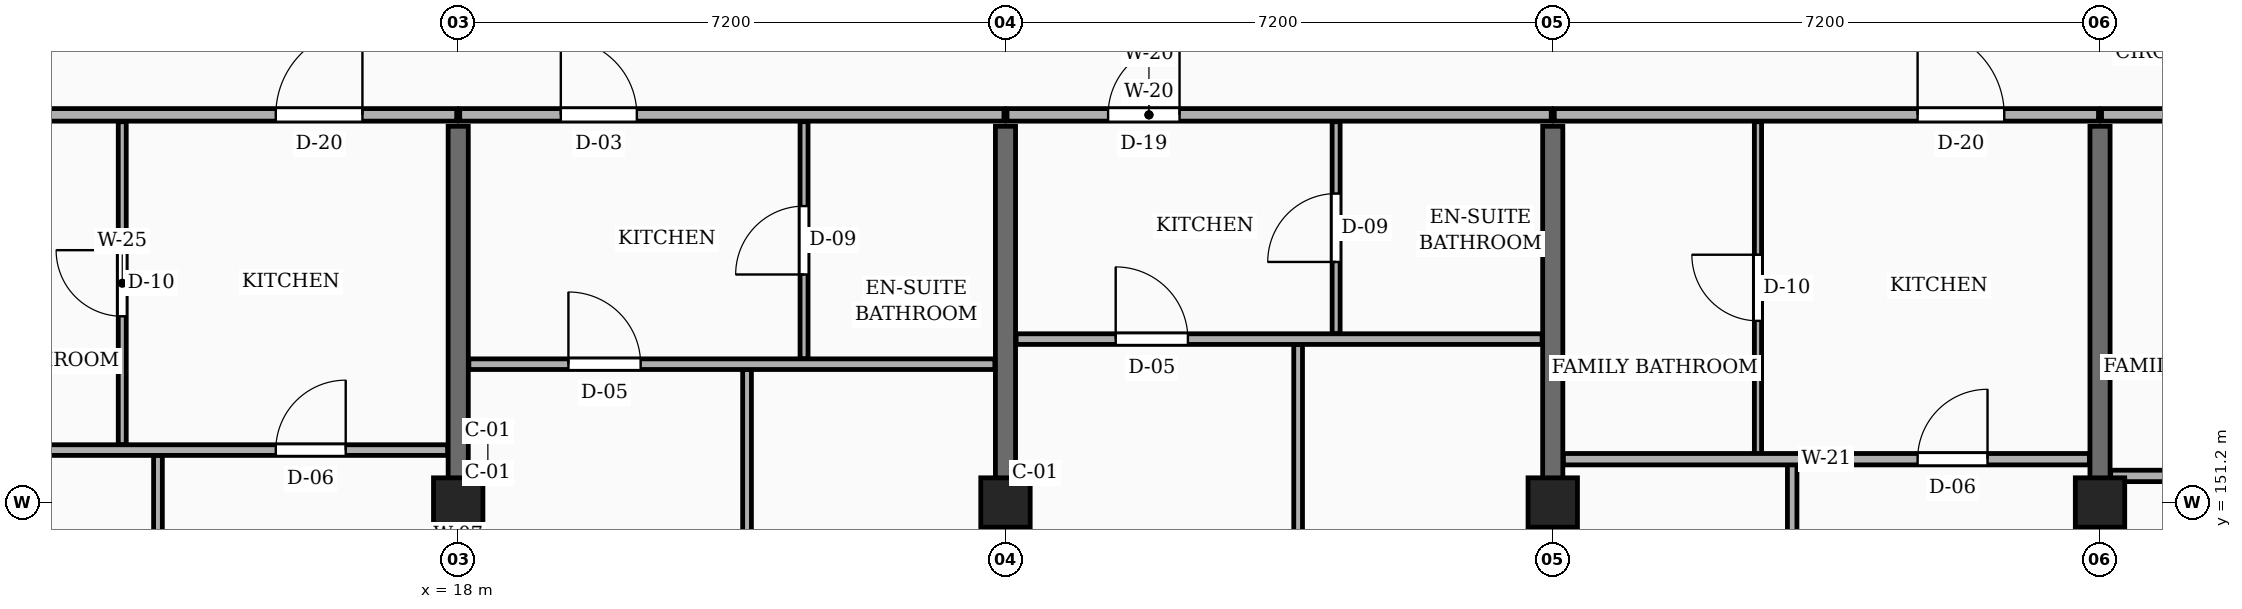
"""IFC4 building model, lengths in metres.
Left out: names, types, materials, properties, quantities, classifications, styles, units other than length and angle.
Written with IfcOpenShell. Run it as: python <this file> out.ifc"""

import sys

from ifc_helpers import new_model, si_unit, direction, frame, frame_2d, origin, origin_2d, place, context, subcontext, project, spatial, rectangle, extrude, element, fill, save


model = new_model("IFC4")
c1 = context("Model", 3, precision=1e-05, world=origin(), true_north=direction((0.0, 1.0)))
c2 = subcontext(c1, "Body", "Model", "MODEL_VIEW")
j1 = project(units=[si_unit("LENGTHUNIT", "METRE"), si_unit("PLANEANGLEUNIT", "RADIAN")], contexts=[c1])
p1 = place(None, origin())
s1 = spatial("IfcSite", under=j1, at=p1, CompositionType="ELEMENT")
p2 = place(p1, origin())
s2 = spatial("IfcBuilding", under=s1, at=p2, CompositionType="ELEMENT")
p3 = place(p2, frame((0.0, 0.0, 4.5)))
s3 = spatial("IfcBuildingStorey", under=s2, at=p3, CompositionType="ELEMENT", Elevation=4.5)
for number, where, z_axis, x_axis in (
    (1, (18.0, 151.2, 0.0), (0.0, 0.0, 1.0), (1.0, 0.0, 0.0)),
    (2, (25.2, 151.2, 0.0), (0.0, 0.0, 1.0), (1.0, 0.0, 0.0)),
    (3, (32.4, 151.2, 0.0), (0.0, 0.0, 1.0), (1.0, 0.0, 0.0)),
    (4, (39.6, 151.2, 0.0), (0.0, 0.0, 1.0), (1.0, 0.0, 0.0)),
):
    element("IfcColumn", number, at=place(p3, frame(where, z_axis=z_axis, x_axis=x_axis)), inside=s3, PredefinedType="COLUMN", context=c2, shape_type="SweptSolid", body=[
        extrude(rectangle(XDim=0.65, YDim=0.65, at=origin_2d()), origin(), (0.0, 0.0, 1.0), 3.15),
    ])
for number, where, z_axis, x_axis in (
    (5, (18.0, 144.3, 0.0), (0.0, 0.0, 1.0), (0.0, 1.0, 0.0)),
    (6, (25.2, 144.3, 0.0), (0.0, 0.0, 1.0), (0.0, 1.0, 0.0)),
    (7, (32.4, 144.3, 0.0), (0.0, 0.0, 1.0), (0.0, 1.0, 0.0)),
    (8, (39.6, 144.3, 0.0), (0.0, 0.0, 1.0), (0.0, 1.0, 0.0)),
):
    element("IfcWall", number, at=place(p3, frame(where, z_axis=z_axis, x_axis=x_axis)), inside=s3, PredefinedType="SOLIDWALL", context=c2, shape_type="SweptSolid", body=[
        extrude(rectangle(XDim=11.85, YDim=0.265, at=frame_2d((5.925, 0.0))), origin(), (0.0, 0.0, 1.0), 2.185),
    ])
p4 = place(p3, frame((10.975, 156.3, 0.0), z_axis=(0.0, 0.0, 1.0), x_axis=(1.0, 0.0, 0.0)))
e9 = element("IfcWall", 9, at=p4, inside=s3, PredefinedType="PARTITIONING", context=c2, shape_type="SweptSolid", body=[
    extrude(rectangle(XDim=7.005, YDim=0.165, at=frame_2d((3.502, 0.0))), origin(), (0.0, 0.0, 1.0), 2.32),
])
p5 = place(p4, frame((4.625, 0.0, 0.0)))
e10 = element("IfcOpeningElement", 10, at=p5, cuts=e9, PredefinedType="OPENING", context=c2, shape_type="SweptSolid", body=[
    extrude(rectangle(XDim=1.14, YDim=2.18, at=frame_2d((0.57, 1.09))), frame((0.0, 0.093, 0.0), z_axis=(0.0, -1.0, 0.0), x_axis=(1.0, 0.0, 0.0)), (0.0, 0.0, 1.0), 0.185),
])
p6 = place(p3, frame((18.02, 156.3, 0.0), z_axis=(0.0, 0.0, 1.0), x_axis=(1.0, 0.0, 0.0)))
e11 = element("IfcWall", 11, at=p6, inside=s3, PredefinedType="PARTITIONING", context=c2, shape_type="SweptSolid", body=[
    extrude(rectangle(XDim=7.16, YDim=0.165, at=frame_2d((3.58, 0.0))), origin(), (0.0, 0.0, 1.0), 2.32),
])
p7 = place(p6, frame((1.33, 0.0, 0.0)))
e12 = element("IfcOpeningElement", 12, at=p7, cuts=e11, PredefinedType="OPENING", context=c2, shape_type="SweptSolid", body=[
    extrude(rectangle(XDim=1.0, YDim=2.15, at=frame_2d((0.5, 1.075))), frame((0.0, 0.093, 0.0), z_axis=(0.0, -1.0, 0.0), x_axis=(1.0, 0.0, 0.0)), (0.0, 0.0, 1.0), 0.185),
])
p8 = place(p3, frame((25.22, 156.3, 0.0), z_axis=(0.0, 0.0, 1.0), x_axis=(1.0, 0.0, 0.0)))
e13 = element("IfcWall", 13, at=p8, inside=s3, PredefinedType="PARTITIONING", context=c2, shape_type="SweptSolid", body=[
    extrude(rectangle(XDim=7.16, YDim=0.165, at=frame_2d((3.58, 0.0))), origin(), (0.0, 0.0, 1.0), 2.32),
])
p9 = place(p8, frame((1.33, 0.0, 0.0)))
e14 = element("IfcOpeningElement", 14, at=p9, cuts=e13, PredefinedType="OPENING", context=c2, shape_type="SweptSolid", body=[
    extrude(rectangle(XDim=0.94, YDim=2.12, at=frame_2d((0.47, 1.06))), frame((0.0, 0.093, 0.0), z_axis=(0.0, -1.0, 0.0), x_axis=(1.0, 0.0, 0.0)), (0.0, 0.0, 1.0), 0.185),
])
p10 = place(p3, frame((32.42, 156.3, 0.0), z_axis=(0.0, 0.0, 1.0), x_axis=(1.0, 0.0, 0.0)))
e15 = element("IfcWall", 15, at=p10, inside=s3, PredefinedType="PARTITIONING", context=c2, shape_type="SweptSolid", body=[
    extrude(rectangle(XDim=7.16, YDim=0.165, at=frame_2d((3.58, 0.0))), origin(), (0.0, 0.0, 1.0), 2.32),
])
p11 = place(p10, frame((4.78, 0.0, 0.0)))
e16 = element("IfcOpeningElement", 16, at=p11, cuts=e15, PredefinedType="OPENING", context=c2, shape_type="SweptSolid", body=[
    extrude(rectangle(XDim=1.14, YDim=2.18, at=frame_2d((0.57, 1.09))), frame((0.0, 0.093, 0.0), z_axis=(0.0, -1.0, 0.0), x_axis=(1.0, 0.0, 0.0)), (0.0, 0.0, 1.0), 0.185),
])
p12 = place(p3, frame((39.62, 156.3, 0.0), z_axis=(0.0, 0.0, 1.0), x_axis=(1.0, 0.0, 0.0)))
e17 = element("IfcWall", 17, at=p12, inside=s3, PredefinedType="PARTITIONING", context=c2, shape_type="SweptSolid", body=[
    extrude(rectangle(XDim=7.16, YDim=0.165, at=frame_2d((3.58, 0.0))), origin(), (0.0, 0.0, 1.0), 2.32),
])
p13 = place(p12, frame((4.78, 0.0, 0.0)))
e18 = element("IfcOpeningElement", 18, at=p13, cuts=e17, PredefinedType="OPENING", context=c2, shape_type="SweptSolid", body=[
    extrude(rectangle(XDim=1.0, YDim=2.15, at=frame_2d((0.5, 1.075))), frame((0.0, 0.093, 0.0), z_axis=(0.0, -1.0, 0.0), x_axis=(1.0, 0.0, 0.0)), (0.0, 0.0, 1.0), 0.185),
])
p14 = place(p3, frame((14.05, 144.175, 0.0), z_axis=(0.0, 0.0, 1.0), x_axis=(0.0, 1.0, 0.0)))
e19 = element("IfcWall", 19, at=p14, inside=s3, PredefinedType="PARTITIONING", context=c2, shape_type="SweptSolid", body=[
    extrude(rectangle(XDim=7.645, YDim=0.115, at=frame_2d((3.823, 0.0))), origin(), (0.0, 0.0, 1.0), 2.32),
])
p15 = place(p14, frame((3.383, 0.0, 0.0)))
e20 = element("IfcOpeningElement", 20, at=p15, cuts=e19, PredefinedType="OPENING", context=c2, shape_type="SweptSolid", body=[
    extrude(rectangle(XDim=0.88, YDim=2.08, at=frame_2d((0.44, 1.04))), frame((0.0, 0.067, 0.0), z_axis=(0.0, -1.0, 0.0), x_axis=(1.0, 0.0, 0.0)), (0.0, 0.0, 1.0), 0.135),
])
p16 = place(p3, frame((13.58, 151.96, 0.0), z_axis=(0.0, 0.0, 1.0), x_axis=(0.0, 1.0, 0.0)))
e21 = element("IfcWall", 21, at=p16, inside=s3, PredefinedType="PARTITIONING", context=c2, shape_type="SweptSolid", body=[
    extrude(rectangle(XDim=4.25, YDim=0.105, at=frame_2d((2.125, 0.0))), origin(), (0.0, 0.0, 1.0), 2.32),
])
p17 = place(p16, frame((1.69, 0.0, 0.0)))
e22 = element("IfcOpeningElement", 22, at=p17, cuts=e21, PredefinedType="OPENING", context=c2, shape_type="SweptSolid", body=[
    extrude(rectangle(XDim=0.87, YDim=2.05, at=frame_2d((0.435, 1.025))), frame((0.0, 0.062, 0.0), z_axis=(0.0, -1.0, 0.0), x_axis=(1.0, 0.0, 0.0)), (0.0, 0.0, 1.0), 0.125),
])
p18 = place(p3, frame((10.975, 151.89, 0.0), z_axis=(0.0, 0.0, 1.0), x_axis=(1.0, 0.0, 0.0)))
e23 = element("IfcWall", 23, at=p18, inside=s3, PredefinedType="PARTITIONING", context=c2, shape_type="SweptSolid", body=[
    extrude(rectangle(XDim=6.885, YDim=0.14, at=frame_2d((3.442, 0.0))), origin(), (0.0, 0.0, 1.0), 2.32),
])
p19 = place(p18, frame((4.625, 0.0, 0.0)))
e24 = element("IfcOpeningElement", 24, at=p19, cuts=e23, PredefinedType="OPENING", context=c2, shape_type="SweptSolid", body=[
    extrude(rectangle(XDim=0.92, YDim=2.1, at=frame_2d((0.46, 1.05))), frame((0.0, 0.08, 0.0), z_axis=(0.0, -1.0, 0.0), x_axis=(1.0, 0.0, 0.0)), (0.0, 0.0, 1.0), 0.16),
])
p20 = place(p3, frame((21.8, 144.175, 0.0), z_axis=(0.0, 0.0, 1.0), x_axis=(0.0, 1.0, 0.0)))
e25 = element("IfcWall", 25, at=p20, inside=s3, PredefinedType="PARTITIONING", context=c2, shape_type="SweptSolid", body=[
    extrude(rectangle(XDim=8.775, YDim=0.115, at=frame_2d((4.387, 0.0))), origin(), (0.0, 0.0, 1.0), 2.32),
])
p21 = place(p20, frame((3.938, 0.0, 0.0)))
e26 = element("IfcOpeningElement", 26, at=p21, cuts=e25, PredefinedType="OPENING", context=c2, shape_type="SweptSolid", body=[
    extrude(rectangle(XDim=0.9, YDim=2.1, at=frame_2d((0.45, 1.05))), frame((0.0, 0.067, 0.0), z_axis=(0.0, -1.0, 0.0), x_axis=(1.0, 0.0, 0.0)), (0.0, 0.0, 1.0), 0.135),
])
p22 = place(p3, frame((22.55, 153.09, 0.0), z_axis=(0.0, 0.0, 1.0), x_axis=(0.0, 1.0, 0.0)))
e27 = element("IfcWall", 27, at=p22, inside=s3, PredefinedType="PARTITIONING", context=c2, shape_type="SweptSolid", body=[
    extrude(rectangle(XDim=3.12, YDim=0.105, at=frame_2d((1.56, 0.0))), origin(), (0.0, 0.0, 1.0), 2.32),
])
p23 = place(p22, frame((1.11, 0.0, 0.0)))
e28 = element("IfcOpeningElement", 28, at=p23, cuts=e27, PredefinedType="OPENING", context=c2, shape_type="SweptSolid", body=[
    extrude(rectangle(XDim=0.9, YDim=2.05, at=frame_2d((0.45, 1.025))), frame((0.0, 0.062, 0.0), z_axis=(0.0, -1.0, 0.0), x_axis=(1.0, 0.0, 0.0)), (0.0, 0.0, 1.0), 0.125),
])
p24 = place(p3, frame((18.14, 153.02, 0.0), z_axis=(0.0, 0.0, 1.0), x_axis=(1.0, 0.0, 0.0)))
e29 = element("IfcWall", 29, at=p24, inside=s3, PredefinedType="PARTITIONING", context=c2, shape_type="SweptSolid", body=[
    extrude(rectangle(XDim=6.92, YDim=0.14, at=frame_2d((3.46, 0.0))), origin(), (0.0, 0.0, 1.0), 2.32),
])
p25 = place(p24, frame((1.31, 0.0, 0.0)))
e30 = element("IfcOpeningElement", 30, at=p25, cuts=e29, PredefinedType="OPENING", context=c2, shape_type="SweptSolid", body=[
    extrude(rectangle(XDim=0.95, YDim=2.1, at=frame_2d((0.475, 1.05))), frame((0.0, 0.08, 0.0), z_axis=(0.0, -1.0, 0.0), x_axis=(1.0, 0.0, 0.0)), (0.0, 0.0, 1.0), 0.16),
])
p26 = place(p3, frame((29.05, 144.175, 0.0), z_axis=(0.0, 0.0, 1.0), x_axis=(0.0, 1.0, 0.0)))
e31 = element("IfcWall", 31, at=p26, inside=s3, PredefinedType="PARTITIONING", context=c2, shape_type="SweptSolid", body=[
    extrude(rectangle(XDim=9.105, YDim=0.115, at=frame_2d((4.552, 0.0))), origin(), (0.0, 0.0, 1.0), 2.32),
])
p27 = place(p26, frame((4.103, 0.0, 0.0)))
e32 = element("IfcOpeningElement", 32, at=p27, cuts=e31, PredefinedType="OPENING", context=c2, shape_type="SweptSolid", body=[
    extrude(rectangle(XDim=0.9, YDim=2.1, at=frame_2d((0.45, 1.05))), frame((0.0, 0.067, 0.0), z_axis=(0.0, -1.0, 0.0), x_axis=(1.0, 0.0, 0.0)), (0.0, 0.0, 1.0), 0.135),
])
p28 = place(p3, frame((29.55, 153.42, 0.0), z_axis=(0.0, 0.0, 1.0), x_axis=(0.0, 1.0, 0.0)))
e33 = element("IfcWall", 33, at=p28, inside=s3, PredefinedType="PARTITIONING", context=c2, shape_type="SweptSolid", body=[
    extrude(rectangle(XDim=2.79, YDim=0.105, at=frame_2d((1.395, 0.0))), origin(), (0.0, 0.0, 1.0), 2.32),
])
p29 = place(p28, frame((0.945, 0.0, 0.0)))
e34 = element("IfcOpeningElement", 34, at=p29, cuts=e33, PredefinedType="OPENING", context=c2, shape_type="SweptSolid", body=[
    extrude(rectangle(XDim=0.9, YDim=2.05, at=frame_2d((0.45, 1.025))), frame((0.0, 0.062, 0.0), z_axis=(0.0, -1.0, 0.0), x_axis=(1.0, 0.0, 0.0)), (0.0, 0.0, 1.0), 0.125),
])
p30 = place(p3, frame((25.34, 153.35, 0.0), z_axis=(0.0, 0.0, 1.0), x_axis=(1.0, 0.0, 0.0)))
e35 = element("IfcWall", 35, at=p30, inside=s3, PredefinedType="PARTITIONING", context=c2, shape_type="SweptSolid", body=[
    extrude(rectangle(XDim=6.92, YDim=0.14, at=frame_2d((3.46, 0.0))), origin(), (0.0, 0.0, 1.0), 2.32),
])
p31 = place(p30, frame((1.31, 0.0, 0.0)))
e36 = element("IfcOpeningElement", 36, at=p31, cuts=e35, PredefinedType="OPENING", context=c2, shape_type="SweptSolid", body=[
    extrude(rectangle(XDim=0.95, YDim=2.1, at=frame_2d((0.475, 1.05))), frame((0.0, 0.08, 0.0), z_axis=(0.0, -1.0, 0.0), x_axis=(1.0, 0.0, 0.0)), (0.0, 0.0, 1.0), 0.16),
])
p32 = place(p3, frame((35.55, 144.175, 0.0), z_axis=(0.0, 0.0, 1.0), x_axis=(0.0, 1.0, 0.0)))
e37 = element("IfcWall", 37, at=p32, inside=s3, PredefinedType="PARTITIONING", context=c2, shape_type="SweptSolid", body=[
    extrude(rectangle(XDim=7.525, YDim=0.125, at=frame_2d((3.762, 0.0))), origin(), (0.0, 0.0, 1.0), 2.32),
])
p33 = place(p32, frame((3.323, 0.0, 0.0)))
e38 = element("IfcOpeningElement", 38, at=p33, cuts=e37, PredefinedType="OPENING", context=c2, shape_type="SweptSolid", body=[
    extrude(rectangle(XDim=0.88, YDim=2.08, at=frame_2d((0.44, 1.04))), frame((0.0, 0.073, 0.0), z_axis=(0.0, -1.0, 0.0), x_axis=(1.0, 0.0, 0.0)), (0.0, 0.0, 1.0), 0.145),
])
p34 = place(p3, frame((35.1, 151.84, 0.0), z_axis=(0.0, 0.0, 1.0), x_axis=(0.0, 1.0, 0.0)))
e39 = element("IfcWall", 39, at=p34, inside=s3, PredefinedType="PARTITIONING", context=c2, shape_type="SweptSolid", body=[
    extrude(rectangle(XDim=4.37, YDim=0.095, at=frame_2d((2.185, 0.0))), origin(), (0.0, 0.0, 1.0), 2.32),
])
p35 = place(p34, frame((1.75, 0.0, 0.0)))
e40 = element("IfcOpeningElement", 40, at=p35, cuts=e39, PredefinedType="OPENING", context=c2, shape_type="SweptSolid", body=[
    extrude(rectangle(XDim=0.87, YDim=2.05, at=frame_2d((0.435, 1.025))), frame((0.0, 0.058, 0.0), z_axis=(0.0, -1.0, 0.0), x_axis=(1.0, 0.0, 0.0)), (0.0, 0.0, 1.0), 0.115),
])
p36 = place(p3, frame((32.54, 151.77, 0.0), z_axis=(0.0, 0.0, 1.0), x_axis=(1.0, 0.0, 0.0)))
e41 = element("IfcWall", 41, at=p36, inside=s3, PredefinedType="PARTITIONING", context=c2, shape_type="SweptSolid", body=[
    extrude(rectangle(XDim=6.92, YDim=0.15, at=frame_2d((3.46, 0.0))), origin(), (0.0, 0.0, 1.0), 2.32),
])
p37 = place(p36, frame((4.66, 0.0, 0.0)))
e42 = element("IfcOpeningElement", 42, at=p37, cuts=e41, PredefinedType="OPENING", context=c2, shape_type="SweptSolid", body=[
    extrude(rectangle(XDim=0.92, YDim=2.1, at=frame_2d((0.46, 1.05))), frame((0.0, 0.085, 0.0), z_axis=(0.0, -1.0, 0.0), x_axis=(1.0, 0.0, 0.0)), (0.0, 0.0, 1.0), 0.17),
])
p38 = place(p3, frame((39.74, 151.55, 0.0), z_axis=(0.0, 0.0, 1.0), x_axis=(1.0, 0.0, 0.0)))
e43 = element("IfcWall", 43, at=p38, inside=s3, PredefinedType="PARTITIONING", context=c2, shape_type="SweptSolid", body=[
    extrude(rectangle(XDim=6.92, YDim=0.15, at=frame_2d((3.46, 0.0))), origin(), (0.0, 0.0, 1.0), 2.32),
])
p39 = place(p38, frame((4.66, 0.0, 0.0)))
e44 = element("IfcOpeningElement", 44, at=p39, cuts=e43, PredefinedType="OPENING", context=c2, shape_type="SweptSolid", body=[
    extrude(rectangle(XDim=0.95, YDim=2.1, at=frame_2d((0.475, 1.05))), frame((0.0, 0.085, 0.0), z_axis=(0.0, -1.0, 0.0), x_axis=(1.0, 0.0, 0.0)), (0.0, 0.0, 1.0), 0.17),
])
p40 = place(p5, origin())
e45 = element("IfcDoor", 45, at=p40, inside=s3, OperationType="SINGLE_SWING_RIGHT", PredefinedType="DOOR", context=c2, shape_type="SweptSolid", body=[
    extrude(rectangle(XDim=1.14, YDim=2.18, at=frame_2d((0.57, 1.09))), frame((0.0, 0.025, 0.0), z_axis=(0.0, -1.0, 0.0), x_axis=(1.0, 0.0, 0.0)), (0.0, 0.0, 1.0), 0.05),
])
fill(e10, e45)
p41 = place(p7, origin())
e46 = element("IfcDoor", 46, at=p41, inside=s3, OperationType="SINGLE_SWING_LEFT", PredefinedType="DOOR", context=c2, shape_type="SweptSolid", body=[
    extrude(rectangle(XDim=1.0, YDim=2.15, at=frame_2d((0.5, 1.075))), frame((0.0, 0.025, 0.0), z_axis=(0.0, -1.0, 0.0), x_axis=(1.0, 0.0, 0.0)), (0.0, 0.0, 1.0), 0.05),
])
fill(e12, e46)
p42 = place(p9, origin())
e47 = element("IfcDoor", 47, at=p42, inside=s3, OperationType="SINGLE_SWING_RIGHT", PredefinedType="DOOR", context=c2, shape_type="SweptSolid", body=[
    extrude(rectangle(XDim=0.94, YDim=2.12, at=frame_2d((0.47, 1.06))), frame((0.0, 0.025, 0.0), z_axis=(0.0, -1.0, 0.0), x_axis=(1.0, 0.0, 0.0)), (0.0, 0.0, 1.0), 0.05),
])
fill(e14, e47)
p43 = place(p11, origin())
e48 = element("IfcDoor", 48, at=p43, inside=s3, OperationType="SINGLE_SWING_LEFT", PredefinedType="DOOR", context=c2, shape_type="SweptSolid", body=[
    extrude(rectangle(XDim=1.14, YDim=2.18, at=frame_2d((0.57, 1.09))), frame((0.0, 0.025, 0.0), z_axis=(0.0, -1.0, 0.0), x_axis=(1.0, 0.0, 0.0)), (0.0, 0.0, 1.0), 0.05),
])
fill(e16, e48)
p44 = place(p17, origin())
e49 = element("IfcDoor", 49, at=p44, inside=s3, OperationType="SINGLE_SWING_RIGHT", PredefinedType="DOOR", context=c2, shape_type="SweptSolid", body=[
    extrude(rectangle(XDim=0.87, YDim=2.05, at=frame_2d((0.435, 1.025))), frame((0.0, 0.025, 0.0), z_axis=(0.0, -1.0, 0.0), x_axis=(1.0, 0.0, 0.0)), (0.0, 0.0, 1.0), 0.05),
])
fill(e22, e49)
p45 = place(p19, origin())
e50 = element("IfcDoor", 50, at=p45, inside=s3, OperationType="SINGLE_SWING_RIGHT", PredefinedType="DOOR", context=c2, shape_type="SweptSolid", body=[
    extrude(rectangle(XDim=0.92, YDim=2.1, at=frame_2d((0.46, 1.05))), frame((0.0, 0.025, 0.0), z_axis=(0.0, -1.0, 0.0), x_axis=(1.0, 0.0, 0.0)), (0.0, 0.0, 1.0), 0.05),
])
fill(e24, e50)
p46 = place(p23, origin())
e51 = element("IfcDoor", 51, at=p46, inside=s3, OperationType="SINGLE_SWING_LEFT", PredefinedType="DOOR", context=c2, shape_type="SweptSolid", body=[
    extrude(rectangle(XDim=0.9, YDim=2.05, at=frame_2d((0.45, 1.025))), frame((0.0, 0.025, 0.0), z_axis=(0.0, -1.0, 0.0), x_axis=(1.0, 0.0, 0.0)), (0.0, 0.0, 1.0), 0.05),
])
fill(e28, e51)
p47 = place(p25, origin())
e52 = element("IfcDoor", 52, at=p47, inside=s3, OperationType="SINGLE_SWING_LEFT", PredefinedType="DOOR", context=c2, shape_type="SweptSolid", body=[
    extrude(rectangle(XDim=0.95, YDim=2.1, at=frame_2d((0.475, 1.05))), frame((0.0, 0.025, 0.0), z_axis=(0.0, -1.0, 0.0), x_axis=(1.0, 0.0, 0.0)), (0.0, 0.0, 1.0), 0.05),
])
fill(e30, e52)
p48 = place(p29, origin())
e53 = element("IfcDoor", 53, at=p48, inside=s3, OperationType="SINGLE_SWING_LEFT", PredefinedType="DOOR", context=c2, shape_type="SweptSolid", body=[
    extrude(rectangle(XDim=0.9, YDim=2.05, at=frame_2d((0.45, 1.025))), frame((0.0, 0.025, 0.0), z_axis=(0.0, -1.0, 0.0), x_axis=(1.0, 0.0, 0.0)), (0.0, 0.0, 1.0), 0.05),
])
fill(e34, e53)
p49 = place(p31, origin())
e54 = element("IfcDoor", 54, at=p49, inside=s3, OperationType="SINGLE_SWING_LEFT", PredefinedType="DOOR", context=c2, shape_type="SweptSolid", body=[
    extrude(rectangle(XDim=0.95, YDim=2.1, at=frame_2d((0.475, 1.05))), frame((0.0, 0.025, 0.0), z_axis=(0.0, -1.0, 0.0), x_axis=(1.0, 0.0, 0.0)), (0.0, 0.0, 1.0), 0.05),
])
fill(e36, e54)
p50 = place(p35, origin())
e55 = element("IfcDoor", 55, at=p50, inside=s3, OperationType="SINGLE_SWING_RIGHT", PredefinedType="DOOR", context=c2, shape_type="SweptSolid", body=[
    extrude(rectangle(XDim=0.87, YDim=2.05, at=frame_2d((0.435, 1.025))), frame((0.0, 0.025, 0.0), z_axis=(0.0, -1.0, 0.0), x_axis=(1.0, 0.0, 0.0)), (0.0, 0.0, 1.0), 0.05),
])
fill(e40, e55)
p51 = place(p37, origin())
e56 = element("IfcDoor", 56, at=p51, inside=s3, OperationType="SINGLE_SWING_RIGHT", PredefinedType="DOOR", context=c2, shape_type="SweptSolid", body=[
    extrude(rectangle(XDim=0.92, YDim=2.1, at=frame_2d((0.46, 1.05))), frame((0.0, 0.025, 0.0), z_axis=(0.0, -1.0, 0.0), x_axis=(1.0, 0.0, 0.0)), (0.0, 0.0, 1.0), 0.05),
])
fill(e42, e56)
save(model, sys.argv[1])
